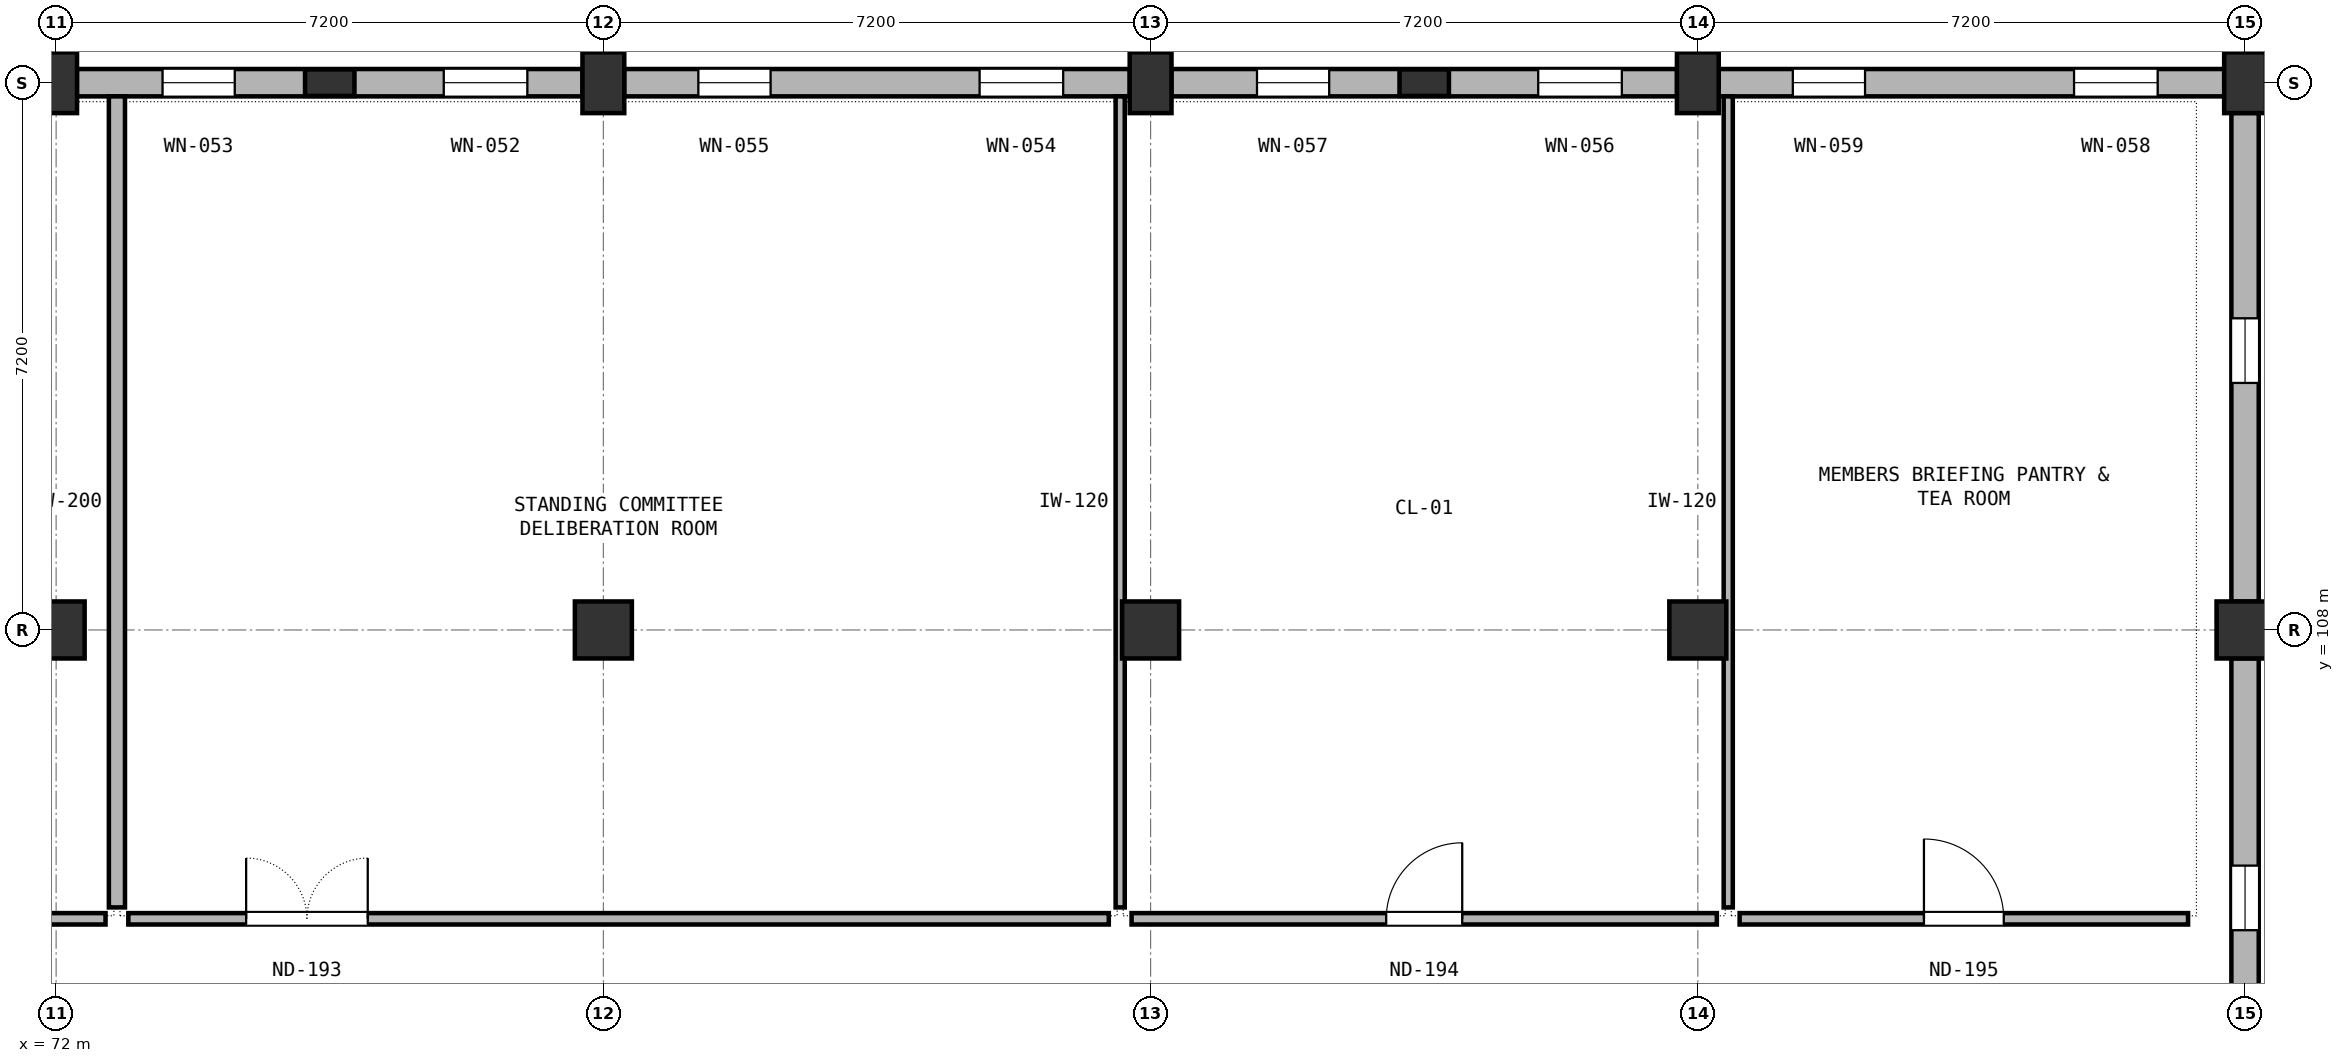
"""IFC4 building model, lengths in metres.
Left out: names, types, materials, properties, quantities, classifications, styles, units other than length and angle.
Written with IfcOpenShell. Run it as: python <this file> out.ifc"""

import sys

from ifc_helpers import new_model, si_unit, direction, frame, frame_2d, origin, origin_2d, place, context, subcontext, project, spatial, rectangle, extrude, element, fill, save


model = new_model("IFC4")
c1 = context("Model", 3, precision=1e-05, world=origin(), true_north=direction((0.0, 1.0)))
c2 = subcontext(c1, "Body", "Model", "MODEL_VIEW")
j1 = project(units=[si_unit("LENGTHUNIT", "METRE"), si_unit("PLANEANGLEUNIT", "RADIAN")], contexts=[c1])
p1 = place(None, origin())
s1 = spatial("IfcSite", under=j1, at=p1, CompositionType="ELEMENT")
p2 = place(p1, origin())
s2 = spatial("IfcBuilding", under=s1, at=p2, CompositionType="ELEMENT")
p3 = place(p2, frame((0.0, 0.0, 10.2)))
s3 = spatial("IfcBuildingStorey", under=s2, at=p3, CompositionType="ELEMENT", Elevation=10.2)
p4 = place(p3, frame((72.0, 108.0, 0.0), z_axis=(0.0, 0.0, 1.0), x_axis=(1.0, 0.0, 0.0)))
e1 = element("IfcColumn", 1, at=p4, inside=s3, PredefinedType="COLUMN", context=c2, shape_type="SweptSolid", body=[
    extrude(rectangle(XDim=0.75, YDim=0.75, at=origin_2d()), origin(), (0.0, 0.0, 1.0), 4.2),
])
p5 = place(p3, frame((72.0, 115.2, 0.0), z_axis=(0.0, 0.0, 1.0), x_axis=(1.0, 0.0, 0.0)))
e2 = element("IfcColumn", 2, at=p5, inside=s3, PredefinedType="COLUMN", context=c2, shape_type="SweptSolid", body=[
    extrude(rectangle(XDim=0.55, YDim=0.8, at=origin_2d()), origin(), (0.0, 0.0, 1.0), 4.2),
])
p6 = place(p3, frame((79.2, 108.0, 0.0), z_axis=(0.0, 0.0, 1.0), x_axis=(1.0, 0.0, 0.0)))
e3 = element("IfcColumn", 3, at=p6, inside=s3, PredefinedType="COLUMN", context=c2, shape_type="SweptSolid", body=[
    extrude(rectangle(XDim=0.75, YDim=0.75, at=origin_2d()), origin(), (0.0, 0.0, 1.0), 4.2),
])
p7 = place(p3, frame((79.2, 115.2, 0.0), z_axis=(0.0, 0.0, 1.0), x_axis=(1.0, 0.0, 0.0)))
e4 = element("IfcColumn", 4, at=p7, inside=s3, PredefinedType="COLUMN", context=c2, shape_type="SweptSolid", body=[
    extrude(rectangle(XDim=0.55, YDim=0.8, at=origin_2d()), origin(), (0.0, 0.0, 1.0), 4.2),
])
p8 = place(p3, frame((86.4, 108.0, 0.0), z_axis=(0.0, 0.0, 1.0), x_axis=(1.0, 0.0, 0.0)))
e5 = element("IfcColumn", 5, at=p8, inside=s3, PredefinedType="COLUMN", context=c2, shape_type="SweptSolid", body=[
    extrude(rectangle(XDim=0.75, YDim=0.75, at=origin_2d()), origin(), (0.0, 0.0, 1.0), 4.2),
])
p9 = place(p3, frame((86.4, 115.2, 0.0), z_axis=(0.0, 0.0, 1.0), x_axis=(1.0, 0.0, 0.0)))
e6 = element("IfcColumn", 6, at=p9, inside=s3, PredefinedType="COLUMN", context=c2, shape_type="SweptSolid", body=[
    extrude(rectangle(XDim=0.55, YDim=0.8, at=origin_2d()), origin(), (0.0, 0.0, 1.0), 4.2),
])
p10 = place(p3, frame((93.6, 108.0, 0.0), z_axis=(0.0, 0.0, 1.0), x_axis=(1.0, 0.0, 0.0)))
e7 = element("IfcColumn", 7, at=p10, inside=s3, PredefinedType="COLUMN", context=c2, shape_type="SweptSolid", body=[
    extrude(rectangle(XDim=0.75, YDim=0.75, at=origin_2d()), origin(), (0.0, 0.0, 1.0), 4.2),
])
p11 = place(p3, frame((93.6, 115.2, 0.0), z_axis=(0.0, 0.0, 1.0), x_axis=(1.0, 0.0, 0.0)))
e8 = element("IfcColumn", 8, at=p11, inside=s3, PredefinedType="COLUMN", context=c2, shape_type="SweptSolid", body=[
    extrude(rectangle(XDim=0.55, YDim=0.8, at=origin_2d()), origin(), (0.0, 0.0, 1.0), 4.2),
])
p12 = place(p3, frame((100.8, 108.0, 0.0), z_axis=(0.0, 0.0, 1.0), x_axis=(1.0, 0.0, 0.0)))
e9 = element("IfcColumn", 9, at=p12, inside=s3, PredefinedType="COLUMN", context=c2, shape_type="SweptSolid", body=[
    extrude(rectangle(XDim=0.75, YDim=0.75, at=origin_2d()), origin(), (0.0, 0.0, 1.0), 4.2),
])
p13 = place(p3, frame((100.8, 115.2, 0.0), z_axis=(0.0, 0.0, 1.0), x_axis=(1.0, 0.0, 0.0)))
e10 = element("IfcColumn", 10, at=p13, inside=s3, PredefinedType="COLUMN", context=c2, shape_type="SweptSolid", body=[
    extrude(rectangle(XDim=0.55, YDim=0.8, at=origin_2d()), origin(), (0.0, 0.0, 1.0), 4.2),
])
for number, where, z_axis, x_axis in (
    (11, (75.6, 115.2, 0.0), (0.0, 0.0, 1.0), (1.0, 0.0, 0.0)),
    (12, (90.0, 115.2, 0.0), (0.0, 0.0, 1.0), (1.0, 0.0, 0.0)),
):
    element("IfcColumn", number, at=place(p3, frame(where, z_axis=z_axis, x_axis=x_axis)), inside=s3, PredefinedType="PILASTER", context=c2, shape_type="SweptSolid", body=[
        extrude(rectangle(XDim=0.65, YDim=0.35, at=origin_2d()), origin(), (0.0, 0.0, 1.0), 4.2),
    ])
p14 = place(p3, frame((78.927, 115.2, 0.0), z_axis=(0.0, 0.0, 1.0), x_axis=(-1.0, 0.0, 0.0)))
e13 = element("IfcWall", 13, at=p14, inside=s3, PredefinedType="SOLIDWALL", context=c2, shape_type="SweptSolid", body=[
    extrude(rectangle(XDim=6.654, YDim=0.36, at=frame_2d((3.327, 0.0))), origin(), (0.0, 0.0, 1.0), 3.04),
])
p15 = place(p14, frame((0.727, 0.0, 0.7)))
e14 = element("IfcOpeningElement", 14, at=p15, cuts=e13, PredefinedType="OPENING", context=c2, shape_type="SweptSolid", body=[
    extrude(rectangle(XDim=1.1, YDim=2.14, at=frame_2d((0.55, 1.07))), frame((0.0, 0.19, 0.0), z_axis=(0.0, -1.0, 0.0), x_axis=(1.0, 0.0, 0.0)), (0.0, 0.0, 1.0), 0.38),
])
p16 = place(p14, frame((4.577, 0.0, 0.7)))
e15 = element("IfcOpeningElement", 15, at=p16, cuts=e13, PredefinedType="OPENING", context=c2, shape_type="SweptSolid", body=[
    extrude(rectangle(XDim=0.95, YDim=2.14, at=frame_2d((0.475, 1.07))), frame((0.0, 0.19, 0.0), z_axis=(0.0, -1.0, 0.0), x_axis=(1.0, 0.0, 0.0)), (0.0, 0.0, 1.0), 0.38),
])
p17 = place(p3, frame((86.127, 115.2, 0.0), z_axis=(0.0, 0.0, 1.0), x_axis=(-1.0, 0.0, 0.0)))
e16 = element("IfcWall", 16, at=p17, inside=s3, PredefinedType="SOLIDWALL", context=c2, shape_type="SweptSolid", body=[
    extrude(rectangle(XDim=6.654, YDim=0.36, at=frame_2d((3.327, 0.0))), origin(), (0.0, 0.0, 1.0), 3.04),
])
p18 = place(p17, frame((0.877, 0.0, 0.7)))
e17 = element("IfcOpeningElement", 17, at=p18, cuts=e16, PredefinedType="OPENING", context=c2, shape_type="SweptSolid", body=[
    extrude(rectangle(XDim=1.1, YDim=2.14, at=frame_2d((0.55, 1.07))), frame((0.0, 0.19, 0.0), z_axis=(0.0, -1.0, 0.0), x_axis=(1.0, 0.0, 0.0)), (0.0, 0.0, 1.0), 0.38),
])
p19 = place(p17, frame((4.727, 0.0, 0.7)))
e18 = element("IfcOpeningElement", 18, at=p19, cuts=e16, PredefinedType="OPENING", context=c2, shape_type="SweptSolid", body=[
    extrude(rectangle(XDim=0.95, YDim=2.14, at=frame_2d((0.475, 1.07))), frame((0.0, 0.19, 0.0), z_axis=(0.0, -1.0, 0.0), x_axis=(1.0, 0.0, 0.0)), (0.0, 0.0, 1.0), 0.38),
])
p20 = place(p3, frame((93.327, 115.2, 0.0), z_axis=(0.0, 0.0, 1.0), x_axis=(-1.0, 0.0, 0.0)))
e19 = element("IfcWall", 19, at=p20, inside=s3, PredefinedType="SOLIDWALL", context=c2, shape_type="SweptSolid", body=[
    extrude(rectangle(XDim=6.654, YDim=0.36, at=frame_2d((3.327, 0.0))), origin(), (0.0, 0.0, 1.0), 3.04),
])
p21 = place(p20, frame((0.727, 0.0, 0.7)))
e20 = element("IfcOpeningElement", 20, at=p21, cuts=e19, PredefinedType="OPENING", context=c2, shape_type="SweptSolid", body=[
    extrude(rectangle(XDim=1.1, YDim=2.14, at=frame_2d((0.55, 1.07))), frame((0.0, 0.19, 0.0), z_axis=(0.0, -1.0, 0.0), x_axis=(1.0, 0.0, 0.0)), (0.0, 0.0, 1.0), 0.38),
])
p22 = place(p20, frame((4.577, 0.0, 0.7)))
e21 = element("IfcOpeningElement", 21, at=p22, cuts=e19, PredefinedType="OPENING", context=c2, shape_type="SweptSolid", body=[
    extrude(rectangle(XDim=0.95, YDim=2.14, at=frame_2d((0.475, 1.07))), frame((0.0, 0.19, 0.0), z_axis=(0.0, -1.0, 0.0), x_axis=(1.0, 0.0, 0.0)), (0.0, 0.0, 1.0), 0.38),
])
p23 = place(p3, frame((100.527, 115.2, 0.0), z_axis=(0.0, 0.0, 1.0), x_axis=(-1.0, 0.0, 0.0)))
e22 = element("IfcWall", 22, at=p23, inside=s3, PredefinedType="SOLIDWALL", context=c2, shape_type="SweptSolid", body=[
    extrude(rectangle(XDim=6.654, YDim=0.36, at=frame_2d((3.327, 0.0))), origin(), (0.0, 0.0, 1.0), 3.04),
])
p24 = place(p23, frame((0.877, 0.0, 0.7)))
e23 = element("IfcOpeningElement", 23, at=p24, cuts=e22, PredefinedType="OPENING", context=c2, shape_type="SweptSolid", body=[
    extrude(rectangle(XDim=1.1, YDim=2.14, at=frame_2d((0.55, 1.07))), frame((0.0, 0.19, 0.0), z_axis=(0.0, -1.0, 0.0), x_axis=(1.0, 0.0, 0.0)), (0.0, 0.0, 1.0), 0.38),
])
p25 = place(p23, frame((4.727, 0.0, 0.7)))
e24 = element("IfcOpeningElement", 24, at=p25, cuts=e22, PredefinedType="OPENING", context=c2, shape_type="SweptSolid", body=[
    extrude(rectangle(XDim=0.95, YDim=2.14, at=frame_2d((0.475, 1.07))), frame((0.0, 0.19, 0.0), z_axis=(0.0, -1.0, 0.0), x_axis=(1.0, 0.0, 0.0)), (0.0, 0.0, 1.0), 0.38),
])
p26 = place(p3, frame((100.8, 107.627, 0.0), z_axis=(0.0, 0.0, 1.0), x_axis=(0.0, -1.0, 0.0)))
e25 = element("IfcWall", 25, at=p26, inside=s3, PredefinedType="SOLIDWALL", context=c2, shape_type="SweptSolid", body=[
    extrude(rectangle(XDim=6.454, YDim=0.36, at=frame_2d((3.227, 0.0))), origin(), (0.0, 0.0, 1.0), 3.04),
])
p27 = place(p26, frame((2.727, 0.0, 0.7)))
e26 = element("IfcOpeningElement", 26, at=p27, cuts=e25, PredefinedType="OPENING", context=c2, shape_type="SweptSolid", body=[
    extrude(rectangle(XDim=0.85, YDim=2.19, at=frame_2d((0.425, 1.095))), frame((0.0, 0.19, 0.0), z_axis=(0.0, -1.0, 0.0), x_axis=(1.0, 0.0, 0.0)), (0.0, 0.0, 1.0), 0.38),
])
p28 = place(p3, frame((100.8, 114.802, 0.0), z_axis=(0.0, 0.0, 1.0), x_axis=(0.0, -1.0, 0.0)))
e27 = element("IfcWall", 27, at=p28, inside=s3, PredefinedType="SOLIDWALL", context=c2, shape_type="SweptSolid", body=[
    extrude(rectangle(XDim=6.429, YDim=0.36, at=frame_2d((3.214, 0.0))), origin(), (0.0, 0.0, 1.0), 3.04),
])
p29 = place(p28, frame((2.702, 0.0, 0.7)))
e28 = element("IfcOpeningElement", 28, at=p29, cuts=e27, PredefinedType="OPENING", context=c2, shape_type="SweptSolid", body=[
    extrude(rectangle(XDim=0.85, YDim=2.19, at=frame_2d((0.425, 1.095))), frame((0.0, 0.19, 0.0), z_axis=(0.0, -1.0, 0.0), x_axis=(1.0, 0.0, 0.0)), (0.0, 0.0, 1.0), 0.38),
])
p30 = place(p3, frame((59.15, 104.2, 0.0), z_axis=(0.0, 0.0, 1.0), x_axis=(1.0, 0.0, 0.0)))
e29 = element("IfcWall", 29, at=p30, inside=s3, PredefinedType="PARTITIONING", context=c2, shape_type="SweptSolid", body=[
    extrude(rectangle(XDim=13.5, YDim=0.15, at=frame_2d((6.75, 0.0))), origin(), (0.0, 0.0, 1.0), 3.08),
])
p31 = place(p30, frame((1.65, 0.0, 0.0)))
e30 = element("IfcOpeningElement", 30, at=p31, cuts=e29, PredefinedType="OPENING", context=c2, shape_type="SweptSolid", body=[
    extrude(rectangle(XDim=1.4, YDim=2.2, at=frame_2d((0.7, 1.1))), frame((0.0, 0.085, 0.0), z_axis=(0.0, -1.0, 0.0), x_axis=(1.0, 0.0, 0.0)), (0.0, 0.0, 1.0), 0.17),
])
p32 = place(p3, frame((72.95, 104.2, 0.0), z_axis=(0.0, 0.0, 1.0), x_axis=(1.0, 0.0, 0.0)))
e31 = element("IfcWall", 31, at=p32, inside=s3, PredefinedType="PARTITIONING", context=c2, shape_type="SweptSolid", body=[
    extrude(rectangle(XDim=12.9, YDim=0.15, at=frame_2d((6.45, 0.0))), origin(), (0.0, 0.0, 1.0), 3.08),
])
p33 = place(p32, frame((1.55, 0.0, 0.0)))
e32 = element("IfcOpeningElement", 32, at=p33, cuts=e31, PredefinedType="OPENING", context=c2, shape_type="SweptSolid", body=[
    extrude(rectangle(XDim=1.6, YDim=2.2, at=frame_2d((0.8, 1.1))), frame((0.0, 0.085, 0.0), z_axis=(0.0, -1.0, 0.0), x_axis=(1.0, 0.0, 0.0)), (0.0, 0.0, 1.0), 0.17),
])
p34 = place(p3, frame((72.8, 104.35, 0.0), z_axis=(0.0, 0.0, 1.0), x_axis=(0.0, 1.0, 0.0)))
e33 = element("IfcWall", 33, at=p34, inside=s3, PredefinedType="PARTITIONING", context=c2, shape_type="SweptSolid", body=[
    extrude(rectangle(XDim=10.67, YDim=0.212, at=frame_2d((5.335, 0.0))), origin(), (0.0, 0.0, 1.0), 3.08),
])
p35 = place(p3, frame((86.15, 104.2, 0.0), z_axis=(0.0, 0.0, 1.0), x_axis=(1.0, 0.0, 0.0)))
e34 = element("IfcWall", 34, at=p35, inside=s3, PredefinedType="PARTITIONING", context=c2, shape_type="SweptSolid", body=[
    extrude(rectangle(XDim=7.7, YDim=0.15, at=frame_2d((3.85, 0.0))), origin(), (0.0, 0.0, 1.0), 3.08),
])
p36 = place(p35, frame((3.35, 0.0, 0.0)))
e35 = element("IfcOpeningElement", 35, at=p36, cuts=e34, PredefinedType="OPENING", context=c2, shape_type="SweptSolid", body=[
    extrude(rectangle(XDim=1.0, YDim=2.15, at=frame_2d((0.5, 1.075))), frame((0.0, 0.085, 0.0), z_axis=(0.0, -1.0, 0.0), x_axis=(1.0, 0.0, 0.0)), (0.0, 0.0, 1.0), 0.17),
])
p37 = place(p3, frame((86.0, 104.35, 0.0), z_axis=(0.0, 0.0, 1.0), x_axis=(0.0, 1.0, 0.0)))
e36 = element("IfcWall", 36, at=p37, inside=s3, PredefinedType="PARTITIONING", context=c2, shape_type="SweptSolid", body=[
    extrude(rectangle(XDim=10.67, YDim=0.12, at=frame_2d((5.335, 0.0))), origin(), (0.0, 0.0, 1.0), 3.08),
])
p38 = place(p3, frame((94.15, 104.2, 0.0), z_axis=(0.0, 0.0, 1.0), x_axis=(1.0, 0.0, 0.0)))
e37 = element("IfcWall", 37, at=p38, inside=s3, PredefinedType="PARTITIONING", context=c2, shape_type="SweptSolid", body=[
    extrude(rectangle(XDim=5.9, YDim=0.15, at=frame_2d((2.95, 0.0))), origin(), (0.0, 0.0, 1.0), 3.08),
])
p39 = place(p38, frame((2.425, 0.0, 0.0)))
e38 = element("IfcOpeningElement", 38, at=p39, cuts=e37, PredefinedType="OPENING", context=c2, shape_type="SweptSolid", body=[
    extrude(rectangle(XDim=1.05, YDim=2.15, at=frame_2d((0.525, 1.075))), frame((0.0, 0.085, 0.0), z_axis=(0.0, -1.0, 0.0), x_axis=(1.0, 0.0, 0.0)), (0.0, 0.0, 1.0), 0.17),
])
p40 = place(p3, frame((94.0, 104.35, 0.0), z_axis=(0.0, 0.0, 1.0), x_axis=(0.0, 1.0, 0.0)))
e39 = element("IfcWall", 39, at=p40, inside=s3, PredefinedType="PARTITIONING", context=c2, shape_type="SweptSolid", body=[
    extrude(rectangle(XDim=10.67, YDim=0.12, at=frame_2d((5.335, 0.0))), origin(), (0.0, 0.0, 1.0), 3.08),
])
p41 = place(p15, origin())
e40 = element("IfcWindow", 40, at=p41, inside=s3, PartitioningType="SINGLE_PANEL", PredefinedType="WINDOW", context=c2, shape_type="SweptSolid", body=[
    extrude(rectangle(XDim=1.1, YDim=2.14, at=frame_2d((0.55, 1.07))), frame((0.0, 0.03, 0.0), z_axis=(0.0, -1.0, 0.0), x_axis=(1.0, 0.0, 0.0)), (0.0, 0.0, 1.0), 0.06),
])
fill(e14, e40)
p42 = place(p16, origin())
e41 = element("IfcWindow", 41, at=p42, inside=s3, PartitioningType="SINGLE_PANEL", PredefinedType="WINDOW", context=c2, shape_type="SweptSolid", body=[
    extrude(rectangle(XDim=0.95, YDim=2.14, at=frame_2d((0.475, 1.07))), frame((0.0, 0.03, 0.0), z_axis=(0.0, -1.0, 0.0), x_axis=(1.0, 0.0, 0.0)), (0.0, 0.0, 1.0), 0.06),
])
fill(e15, e41)
p43 = place(p18, origin())
e42 = element("IfcWindow", 42, at=p43, inside=s3, PartitioningType="SINGLE_PANEL", PredefinedType="WINDOW", context=c2, shape_type="SweptSolid", body=[
    extrude(rectangle(XDim=1.1, YDim=2.14, at=frame_2d((0.55, 1.07))), frame((0.0, 0.03, 0.0), z_axis=(0.0, -1.0, 0.0), x_axis=(1.0, 0.0, 0.0)), (0.0, 0.0, 1.0), 0.06),
])
fill(e17, e42)
p44 = place(p19, origin())
e43 = element("IfcWindow", 43, at=p44, inside=s3, PartitioningType="SINGLE_PANEL", PredefinedType="WINDOW", context=c2, shape_type="SweptSolid", body=[
    extrude(rectangle(XDim=0.95, YDim=2.14, at=frame_2d((0.475, 1.07))), frame((0.0, 0.03, 0.0), z_axis=(0.0, -1.0, 0.0), x_axis=(1.0, 0.0, 0.0)), (0.0, 0.0, 1.0), 0.06),
])
fill(e18, e43)
p45 = place(p21, origin())
e44 = element("IfcWindow", 44, at=p45, inside=s3, PartitioningType="SINGLE_PANEL", PredefinedType="WINDOW", context=c2, shape_type="SweptSolid", body=[
    extrude(rectangle(XDim=1.1, YDim=2.14, at=frame_2d((0.55, 1.07))), frame((0.0, 0.03, 0.0), z_axis=(0.0, -1.0, 0.0), x_axis=(1.0, 0.0, 0.0)), (0.0, 0.0, 1.0), 0.06),
])
fill(e20, e44)
p46 = place(p22, origin())
e45 = element("IfcWindow", 45, at=p46, inside=s3, PartitioningType="SINGLE_PANEL", PredefinedType="WINDOW", context=c2, shape_type="SweptSolid", body=[
    extrude(rectangle(XDim=0.95, YDim=2.14, at=frame_2d((0.475, 1.07))), frame((0.0, 0.03, 0.0), z_axis=(0.0, -1.0, 0.0), x_axis=(1.0, 0.0, 0.0)), (0.0, 0.0, 1.0), 0.06),
])
fill(e21, e45)
p47 = place(p24, origin())
e46 = element("IfcWindow", 46, at=p47, inside=s3, PartitioningType="SINGLE_PANEL", PredefinedType="WINDOW", context=c2, shape_type="SweptSolid", body=[
    extrude(rectangle(XDim=1.1, YDim=2.14, at=frame_2d((0.55, 1.07))), frame((0.0, 0.03, 0.0), z_axis=(0.0, -1.0, 0.0), x_axis=(1.0, 0.0, 0.0)), (0.0, 0.0, 1.0), 0.06),
])
fill(e23, e46)
p48 = place(p25, origin())
e47 = element("IfcWindow", 47, at=p48, inside=s3, PartitioningType="SINGLE_PANEL", PredefinedType="WINDOW", context=c2, shape_type="SweptSolid", body=[
    extrude(rectangle(XDim=0.95, YDim=2.14, at=frame_2d((0.475, 1.07))), frame((0.0, 0.03, 0.0), z_axis=(0.0, -1.0, 0.0), x_axis=(1.0, 0.0, 0.0)), (0.0, 0.0, 1.0), 0.06),
])
fill(e24, e47)
p49 = place(p27, origin())
e48 = element("IfcWindow", 48, at=p49, inside=s3, PartitioningType="SINGLE_PANEL", PredefinedType="WINDOW", context=c2, shape_type="SweptSolid", body=[
    extrude(rectangle(XDim=0.85, YDim=2.19, at=frame_2d((0.425, 1.095))), frame((0.0, 0.03, 0.0), z_axis=(0.0, -1.0, 0.0), x_axis=(1.0, 0.0, 0.0)), (0.0, 0.0, 1.0), 0.06),
])
fill(e26, e48)
p50 = place(p29, origin())
e49 = element("IfcWindow", 49, at=p50, inside=s3, PartitioningType="SINGLE_PANEL", PredefinedType="WINDOW", context=c2, shape_type="SweptSolid", body=[
    extrude(rectangle(XDim=0.85, YDim=2.19, at=frame_2d((0.425, 1.095))), frame((0.0, 0.03, 0.0), z_axis=(0.0, -1.0, 0.0), x_axis=(1.0, 0.0, 0.0)), (0.0, 0.0, 1.0), 0.06),
])
fill(e28, e49)
p51 = place(p33, origin())
e50 = element("IfcDoor", 50, at=p51, inside=s3, OperationType="DOUBLE_DOOR_SINGLE_SWING", PredefinedType="DOOR", context=c2, shape_type="SweptSolid", body=[
    extrude(rectangle(XDim=1.6, YDim=2.2, at=frame_2d((0.8, 1.1))), frame((0.0, 0.025, 0.0), z_axis=(0.0, -1.0, 0.0), x_axis=(1.0, 0.0, 0.0)), (0.0, 0.0, 1.0), 0.05),
])
fill(e32, e50)
p52 = place(p36, origin())
e51 = element("IfcDoor", 51, at=p52, inside=s3, OperationType="SINGLE_SWING_RIGHT", PredefinedType="DOOR", context=c2, shape_type="SweptSolid", body=[
    extrude(rectangle(XDim=1.0, YDim=2.15, at=frame_2d((0.5, 1.075))), frame((0.0, 0.025, 0.0), z_axis=(0.0, -1.0, 0.0), x_axis=(1.0, 0.0, 0.0)), (0.0, 0.0, 1.0), 0.05),
])
fill(e35, e51)
p53 = place(p39, origin())
e52 = element("IfcDoor", 52, at=p53, inside=s3, OperationType="SINGLE_SWING_LEFT", PredefinedType="DOOR", context=c2, shape_type="SweptSolid", body=[
    extrude(rectangle(XDim=1.05, YDim=2.15, at=frame_2d((0.525, 1.075))), frame((0.0, 0.025, 0.0), z_axis=(0.0, -1.0, 0.0), x_axis=(1.0, 0.0, 0.0)), (0.0, 0.0, 1.0), 0.05),
])
fill(e38, e52)
save(model, sys.argv[1])
